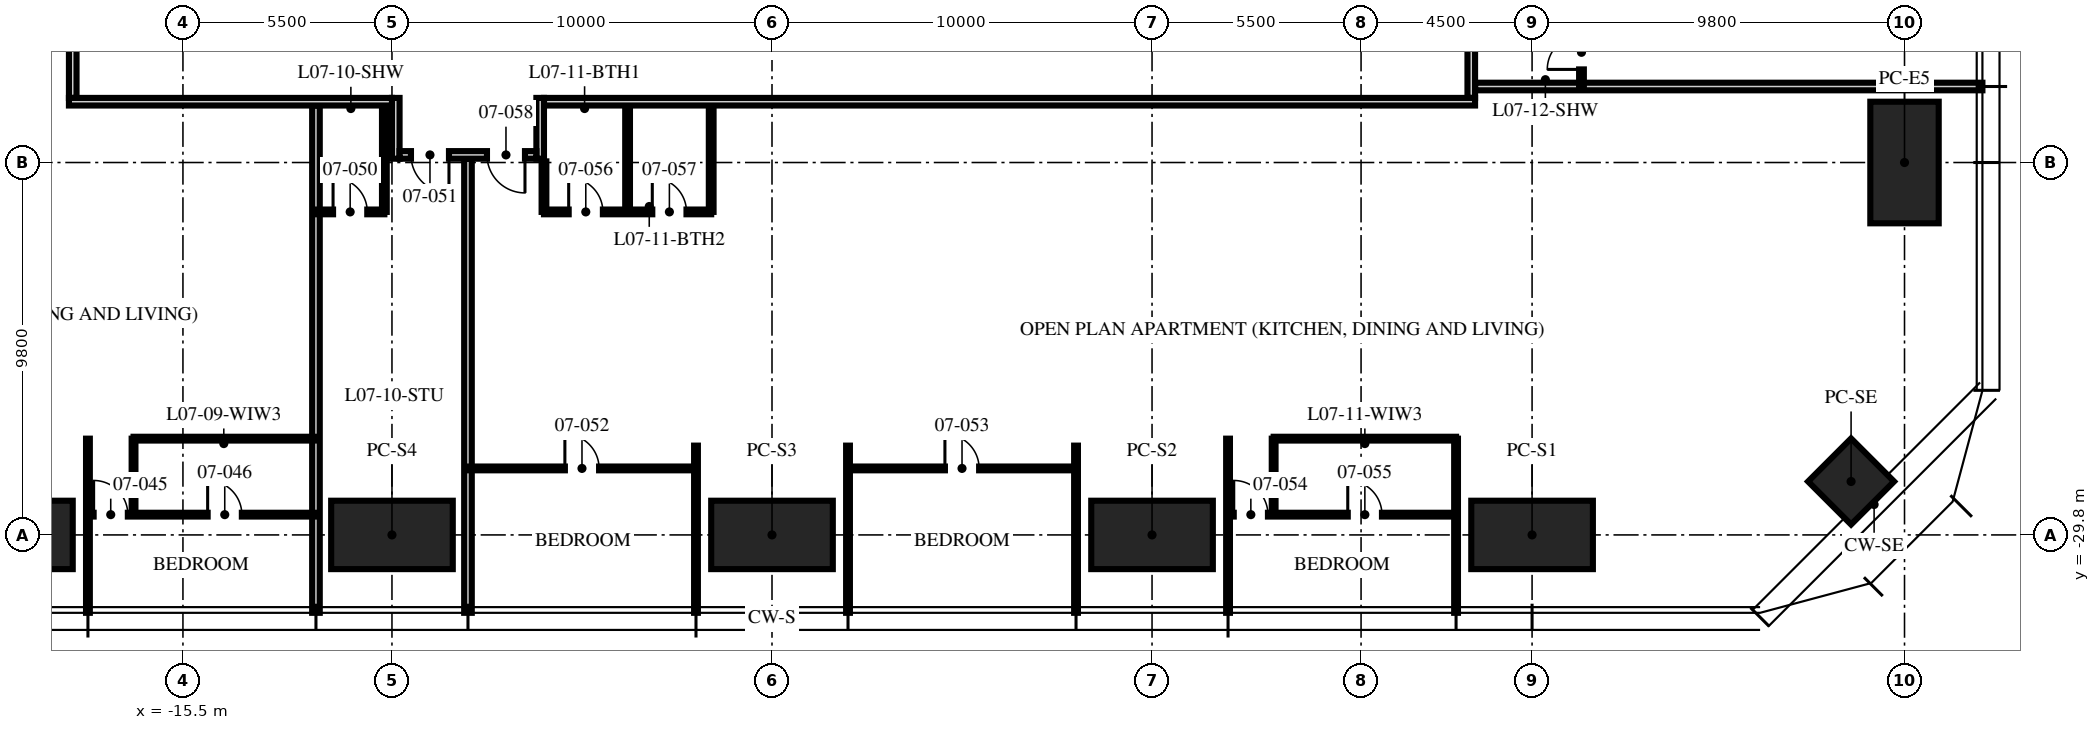
"""IFC4 building model, lengths in metres.
Left out: names, types, materials, properties, quantities, classifications, styles, units other than length and angle.
Written with IfcOpenShell. Run it as: python <this file> out.ifc"""

import sys

from ifc_helpers import new_model, si_unit, direction, frame, frame_2d, origin, origin_2d, place, context, subcontext, project, spatial, rectangle, hollow_rectangle, extrude, element, fill, save


model = new_model("IFC4")
c1 = context("Model", 3, precision=1e-05, world=origin(), true_north=direction((0.0, 1.0)))
c2 = subcontext(c1, "Body", "Model", "MODEL_VIEW")
j1 = project(units=[si_unit("LENGTHUNIT", "METRE"), si_unit("PLANEANGLEUNIT", "RADIAN")], contexts=[c1])
p1 = place(None, origin())
s1 = spatial("IfcSite", under=j1, at=p1, CompositionType="ELEMENT")
p2 = place(p1, origin())
s2 = spatial("IfcBuilding", under=s1, at=p2, CompositionType="ELEMENT")
p3 = place(p2, frame((0.0, 0.0, 32.25)))
s3 = spatial("IfcBuildingStorey", under=s2, at=p3, CompositionType="ELEMENT", Elevation=32.25)
for number, where, z_axis, x_axis in (
    (1, (29.8, -20.0, 0.0), (0.0, 0.0, 1.0), (0.0, 1.0, 0.0)),
    (2, (20.0, -29.8, 0.0), (0.0, 0.0, 1.0), (1.0, 0.0, 0.0)),
    (3, (10.0, -29.8, 0.0), (0.0, 0.0, 1.0), (1.0, 0.0, 0.0)),
    (4, (0.0, -29.8, 0.0), (0.0, 0.0, 1.0), (1.0, 0.0, 0.0)),
    (5, (-10.0, -29.8, 0.0), (0.0, 0.0, 1.0), (1.0, 0.0, 0.0)),
    (6, (-20.0, -29.8, 0.0), (0.0, 0.0, 1.0), (1.0, 0.0, 0.0)),
):
    element("IfcColumn", number, at=place(p3, frame(where, z_axis=z_axis, x_axis=x_axis)), inside=s3, PredefinedType="COLUMN", context=c2, shape_type="SweptSolid", body=[
        extrude(hollow_rectangle(XDim=3.2, YDim=1.8, WallThickness=0.2, at=origin_2d()), origin(), (0.0, 0.0, 1.0), 3.75),
    ])
p4 = place(p3, frame((28.394, -28.394, 0.0), z_axis=(0.0, 0.0, 1.0), x_axis=(0.707106781187, 0.707106781187, 0.0)))
e7 = element("IfcColumn", 7, at=p4, inside=s3, PredefinedType="COLUMN", context=c2, shape_type="SweptSolid", body=[
    extrude(hollow_rectangle(XDim=1.6, YDim=1.6, WallThickness=0.1, at=origin_2d()), origin(), (0.0, 0.0, 1.0), 3.75),
])
p5 = place(p3, frame((-18.0, -27.267, 0.0), z_axis=(0.0, 0.0, 1.0), x_axis=(0.0, -1.0, 0.0)))
e8 = element("IfcWall", 8, at=p5, inside=s3, PredefinedType="PARTITIONING", context=c2, shape_type="SweptSolid", body=[
    extrude(rectangle(XDim=4.583, YDim=0.1, at=frame_2d((2.292, 0.0))), origin(), (0.0, 0.0, 1.0), 2.71),
])
p6 = place(p3, frame((-12.0, -18.5, 0.0), z_axis=(0.0, 0.0, 1.0), x_axis=(0.0, -1.0, 0.0)))
e9 = element("IfcWall", 9, at=p6, inside=s3, PredefinedType="PARTITIONING", context=c2, shape_type="SweptSolid", body=[
    extrude(rectangle(XDim=13.35, YDim=0.2, at=frame_2d((6.675, 0.0))), origin(), (0.0, 0.0, 1.0), 2.71),
])
p7 = place(p3, frame((-8.0, -19.9, 0.0), z_axis=(0.0, 0.0, 1.0), x_axis=(0.0, -1.0, 0.0)))
e10 = element("IfcWall", 10, at=p7, inside=s3, PredefinedType="PARTITIONING", context=c2, shape_type="SweptSolid", body=[
    extrude(rectangle(XDim=11.95, YDim=0.2, at=frame_2d((5.975, 0.0))), origin(), (0.0, 0.0, 1.0), 2.71),
])
for number, where, z_axis, x_axis in (
    (11, (-2.0, -27.45, 0.0), (0.0, 0.0, 1.0), (0.0, -1.0, 0.0)),
    (12, (2.0, -27.45, 0.0), (0.0, 0.0, 1.0), (0.0, -1.0, 0.0)),
    (13, (8.0, -27.45, 0.0), (0.0, 0.0, 1.0), (0.0, -1.0, 0.0)),
):
    element("IfcWall", number, at=place(p3, frame(where, z_axis=z_axis, x_axis=x_axis)), inside=s3, PredefinedType="PARTITIONING", context=c2, shape_type="SweptSolid", body=[
        extrude(rectangle(XDim=4.4, YDim=0.1, at=frame_2d((2.2, 0.0))), origin(), (0.0, 0.0, 1.0), 2.71),
    ])
for number, where, z_axis, x_axis in (
    (14, (12.0, -27.267, 0.0), (0.0, 0.0, 1.0), (0.0, -1.0, 0.0)),
    (15, (18.0, -27.267, 0.0), (0.0, 0.0, 1.0), (0.0, -1.0, 0.0)),
):
    element("IfcWall", number, at=place(p3, frame(where, z_axis=z_axis, x_axis=x_axis)), inside=s3, PredefinedType="PARTITIONING", context=c2, shape_type="SweptSolid", body=[
        extrude(rectangle(XDim=4.583, YDim=0.1, at=frame_2d((2.292, 0.0))), origin(), (0.0, 0.0, 1.0), 2.71),
    ])
p8 = place(p3, frame((18.5, -18.0, 0.0), z_axis=(0.0, 0.0, 1.0), x_axis=(1.0, 0.0, 0.0)))
e16 = element("IfcWall", 16, at=p8, inside=s3, PredefinedType="PARTITIONING", context=c2, shape_type="SweptSolid", body=[
    extrude(rectangle(XDim=13.35, YDim=0.2, at=frame_2d((6.675, 0.0))), origin(), (0.0, 0.0, 1.0), 2.3),
])
p9 = place(p3, frame((-18.0, -29.267, 0.0), z_axis=(0.0, 0.0, 1.0), x_axis=(1.0, 0.0, 0.0)))
e17 = element("IfcWall", 17, at=p9, inside=s3, PredefinedType="PARTITIONING", context=c2, shape_type="SweptSolid", body=[
    extrude(rectangle(XDim=6.0, YDim=0.1, at=frame_2d((3.0, 0.0))), origin(), (0.0, 0.0, 1.0), 2.61),
])
p10 = place(p9, frame((0.15, 0.0, 0.0)))
e18 = element("IfcOpeningElement", 18, at=p10, cuts=e17, PredefinedType="OPENING", context=c2, shape_type="SweptSolid", body=[
    extrude(rectangle(XDim=0.9, YDim=2.1, at=frame_2d((0.45, 1.05))), frame((0.0, 0.06, 0.0), z_axis=(0.0, -1.0, 0.0), x_axis=(1.0, 0.0, 0.0)), (0.0, 0.0, 1.0), 0.12),
])
p11 = place(p9, frame((3.15, 0.0, 0.0)))
e19 = element("IfcOpeningElement", 19, at=p11, cuts=e17, PredefinedType="OPENING", context=c2, shape_type="SweptSolid", body=[
    extrude(rectangle(XDim=0.9, YDim=2.1, at=frame_2d((0.45, 1.05))), frame((0.0, 0.06, 0.0), z_axis=(0.0, -1.0, 0.0), x_axis=(1.0, 0.0, 0.0)), (0.0, 0.0, 1.0), 0.12),
])
p12 = place(p3, frame((-16.8, -27.267, 0.0), z_axis=(0.0, 0.0, 1.0), x_axis=(0.0, -1.0, 0.0)))
e20 = element("IfcWall", 20, at=p12, inside=s3, PredefinedType="PARTITIONING", context=c2, shape_type="SweptSolid", body=[
    extrude(rectangle(XDim=2.0, YDim=0.1, at=frame_2d((1.0, 0.0))), origin(), (0.0, 0.0, 1.0), 3.5),
])
p13 = place(p3, frame((-16.8, -27.267, 0.0), z_axis=(0.0, 0.0, 1.0), x_axis=(1.0, 0.0, 0.0)))
e21 = element("IfcWall", 21, at=p13, inside=s3, PredefinedType="PARTITIONING", context=c2, shape_type="SweptSolid", body=[
    extrude(rectangle(XDim=4.8, YDim=0.1, at=frame_2d((2.4, 0.0))), origin(), (0.0, 0.0, 1.0), 2.61),
])
p14 = place(p3, frame((-12.0, -21.3, 0.0), z_axis=(0.0, 0.0, 1.0), x_axis=(1.0, 0.0, 0.0)))
e22 = element("IfcWall", 22, at=p14, inside=s3, PredefinedType="PARTITIONING", context=c2, shape_type="SweptSolid", body=[
    extrude(rectangle(XDim=1.8, YDim=0.125, at=frame_2d((0.9, 0.0))), origin(), (0.0, 0.0, 1.0), 3.5),
])
p15 = place(p14, frame((0.45, 0.0, 0.0)))
e23 = element("IfcOpeningElement", 23, at=p15, cuts=e22, PredefinedType="OPENING", context=c2, shape_type="SweptSolid", body=[
    extrude(rectangle(XDim=0.9, YDim=2.1, at=frame_2d((0.45, 1.05))), frame((0.0, 0.073, 0.0), z_axis=(0.0, -1.0, 0.0), x_axis=(1.0, 0.0, 0.0)), (0.0, 0.0, 1.0), 0.145),
])
p16 = place(p3, frame((-10.2, -18.5, 0.0), z_axis=(0.0, 0.0, 1.0), x_axis=(0.0, -1.0, 0.0)))
e24 = element("IfcWall", 24, at=p16, inside=s3, PredefinedType="PARTITIONING", context=c2, shape_type="SweptSolid", body=[
    extrude(rectangle(XDim=2.8, YDim=0.125, at=frame_2d((1.4, 0.0))), origin(), (0.0, 0.0, 1.0), 2.492),
])
p17 = place(p3, frame((-8.0, -28.05, 0.0), z_axis=(0.0, 0.0, 1.0), x_axis=(1.0, 0.0, 0.0)))
e25 = element("IfcWall", 25, at=p17, inside=s3, PredefinedType="PARTITIONING", context=c2, shape_type="SweptSolid", body=[
    extrude(rectangle(XDim=6.0, YDim=0.1, at=frame_2d((3.0, 0.0))), origin(), (0.0, 0.0, 1.0), 2.61),
])
p18 = place(p17, frame((2.55, 0.0, 0.0)))
e26 = element("IfcOpeningElement", 26, at=p18, cuts=e25, PredefinedType="OPENING", context=c2, shape_type="SweptSolid", body=[
    extrude(rectangle(XDim=0.9, YDim=2.1, at=frame_2d((0.45, 1.05))), frame((0.0, 0.06, 0.0), z_axis=(0.0, -1.0, 0.0), x_axis=(1.0, 0.0, 0.0)), (0.0, 0.0, 1.0), 0.12),
])
p19 = place(p3, frame((2.0, -28.05, 0.0), z_axis=(0.0, 0.0, 1.0), x_axis=(1.0, 0.0, 0.0)))
e27 = element("IfcWall", 27, at=p19, inside=s3, PredefinedType="PARTITIONING", context=c2, shape_type="SweptSolid", body=[
    extrude(rectangle(XDim=6.0, YDim=0.1, at=frame_2d((3.0, 0.0))), origin(), (0.0, 0.0, 1.0), 2.61),
])
p20 = place(p19, frame((2.55, 0.0, 0.0)))
e28 = element("IfcOpeningElement", 28, at=p20, cuts=e27, PredefinedType="OPENING", context=c2, shape_type="SweptSolid", body=[
    extrude(rectangle(XDim=0.9, YDim=2.1, at=frame_2d((0.45, 1.05))), frame((0.0, 0.06, 0.0), z_axis=(0.0, -1.0, 0.0), x_axis=(1.0, 0.0, 0.0)), (0.0, 0.0, 1.0), 0.12),
])
p21 = place(p3, frame((12.0, -29.267, 0.0), z_axis=(0.0, 0.0, 1.0), x_axis=(1.0, 0.0, 0.0)))
e29 = element("IfcWall", 29, at=p21, inside=s3, PredefinedType="PARTITIONING", context=c2, shape_type="SweptSolid", body=[
    extrude(rectangle(XDim=6.0, YDim=0.1, at=frame_2d((3.0, 0.0))), origin(), (0.0, 0.0, 1.0), 2.61),
])
p22 = place(p21, frame((0.15, 0.0, 0.0)))
e30 = element("IfcOpeningElement", 30, at=p22, cuts=e29, PredefinedType="OPENING", context=c2, shape_type="SweptSolid", body=[
    extrude(rectangle(XDim=0.9, YDim=2.1, at=frame_2d((0.45, 1.05))), frame((0.0, 0.06, 0.0), z_axis=(0.0, -1.0, 0.0), x_axis=(1.0, 0.0, 0.0)), (0.0, 0.0, 1.0), 0.12),
])
p23 = place(p21, frame((3.15, 0.0, 0.0)))
e31 = element("IfcOpeningElement", 31, at=p23, cuts=e29, PredefinedType="OPENING", context=c2, shape_type="SweptSolid", body=[
    extrude(rectangle(XDim=0.9, YDim=2.1, at=frame_2d((0.45, 1.05))), frame((0.0, 0.06, 0.0), z_axis=(0.0, -1.0, 0.0), x_axis=(1.0, 0.0, 0.0)), (0.0, 0.0, 1.0), 0.12),
])
p24 = place(p3, frame((13.2, -27.267, 0.0), z_axis=(0.0, 0.0, 1.0), x_axis=(0.0, -1.0, 0.0)))
e32 = element("IfcWall", 32, at=p24, inside=s3, PredefinedType="PARTITIONING", context=c2, shape_type="SweptSolid", body=[
    extrude(rectangle(XDim=2.0, YDim=0.1, at=frame_2d((1.0, 0.0))), origin(), (0.0, 0.0, 1.0), 3.5),
])
p25 = place(p3, frame((13.2, -27.267, 0.0), z_axis=(0.0, 0.0, 1.0), x_axis=(1.0, 0.0, 0.0)))
e33 = element("IfcWall", 33, at=p25, inside=s3, PredefinedType="PARTITIONING", context=c2, shape_type="SweptSolid", body=[
    extrude(rectangle(XDim=4.8, YDim=0.1, at=frame_2d((2.4, 0.0))), origin(), (0.0, 0.0, 1.0), 2.61),
])
p26 = place(p3, frame((-6.0, -21.3, 0.0), z_axis=(0.0, 0.0, 1.0), x_axis=(1.0, 0.0, 0.0)))
e34 = element("IfcWall", 34, at=p26, inside=s3, PredefinedType="PARTITIONING", context=c2, shape_type="SweptSolid", body=[
    extrude(rectangle(XDim=4.4, YDim=0.125, at=frame_2d((2.2, 0.0))), origin(), (0.0, 0.0, 1.0), 2.61),
])
p27 = place(p26, frame((0.65, 0.0, 0.0)))
e35 = element("IfcOpeningElement", 35, at=p27, cuts=e34, PredefinedType="OPENING", context=c2, shape_type="SweptSolid", body=[
    extrude(rectangle(XDim=0.9, YDim=2.1, at=frame_2d((0.45, 1.05))), frame((0.0, 0.073, 0.0), z_axis=(0.0, -1.0, 0.0), x_axis=(1.0, 0.0, 0.0)), (0.0, 0.0, 1.0), 0.145),
])
p28 = place(p26, frame((2.85, 0.0, 0.0)))
e36 = element("IfcOpeningElement", 36, at=p28, cuts=e34, PredefinedType="OPENING", context=c2, shape_type="SweptSolid", body=[
    extrude(rectangle(XDim=0.9, YDim=2.1, at=frame_2d((0.45, 1.05))), frame((0.0, 0.073, 0.0), z_axis=(0.0, -1.0, 0.0), x_axis=(1.0, 0.0, 0.0)), (0.0, 0.0, 1.0), 0.145),
])
p29 = place(p3, frame((-6.0, -19.97, 0.0), z_axis=(0.0, 0.0, 1.0), x_axis=(0.0, -1.0, 0.0)))
e37 = element("IfcWall", 37, at=p29, inside=s3, PredefinedType="PARTITIONING", context=c2, shape_type="SweptSolid", body=[
    extrude(rectangle(XDim=1.33, YDim=0.125, at=frame_2d((0.665, 0.0))), origin(), (0.0, 0.0, 1.0), 3.5),
])
for number, where, z_axis, x_axis in (
    (38, (-3.8, -18.5, 0.0), (0.0, 0.0, 1.0), (0.0, -1.0, 0.0)),
    (39, (-1.6, -18.5, 0.0), (0.0, 0.0, 1.0), (0.0, -1.0, 0.0)),
):
    element("IfcWall", number, at=place(p3, frame(where, z_axis=z_axis, x_axis=x_axis)), inside=s3, PredefinedType="PARTITIONING", context=c2, shape_type="SweptSolid", body=[
        extrude(rectangle(XDim=2.8, YDim=0.125, at=frame_2d((1.4, 0.0))), origin(), (0.0, 0.0, 1.0), 3.5),
    ])
p30 = place(p3, frame((21.3, -18.0, 0.0), z_axis=(0.0, 0.0, 1.0), x_axis=(0.0, 1.0, 0.0)))
e40 = element("IfcWall", 40, at=p30, inside=s3, PredefinedType="PARTITIONING", context=c2, shape_type="SweptSolid", body=[
    extrude(rectangle(XDim=1.8, YDim=0.125, at=frame_2d((0.9, 0.0))), origin(), (0.0, 0.0, 1.0), 3.5),
])
p31 = place(p30, frame((0.45, 0.0, 0.0)))
e41 = element("IfcOpeningElement", 41, at=p31, cuts=e40, PredefinedType="OPENING", context=c2, shape_type="SweptSolid", body=[
    extrude(rectangle(XDim=0.9, YDim=2.1, at=frame_2d((0.45, 1.05))), frame((0.0, 0.073, 0.0), z_axis=(0.0, -1.0, 0.0), x_axis=(1.0, 0.0, 0.0)), (0.0, 0.0, 1.0), 0.145),
])
p32 = place(p3, frame((18.4, -18.3, 0.0), z_axis=(0.0, 0.0, 1.0), x_axis=(0.0, 1.0, 0.0)))
e42 = element("IfcWall", 42, at=p32, inside=s3, PredefinedType="PARTITIONING", context=c2, shape_type="SweptSolid", body=[
    extrude(rectangle(XDim=4.3, YDim=0.2, at=frame_2d((2.15, 0.0))), origin(), (0.0, 0.0, 1.0), 2.3),
])
p33 = place(p3, frame((-18.4, 0.0, 0.0), z_axis=(0.0, 0.0, 1.0), x_axis=(0.0, -1.0, 0.0)))
e43 = element("IfcWall", 43, at=p33, inside=s3, PredefinedType="PARTITIONING", context=c2, shape_type="SweptSolid", body=[
    extrude(rectangle(XDim=18.3, YDim=0.2, at=frame_2d((9.15, 0.0))), origin(), (0.0, 0.0, 1.0), 2.3),
])
p34 = place(p3, frame((18.5, -18.4, 0.0), z_axis=(0.0, 0.0, 1.0), x_axis=(-1.0, 0.0, 0.0)))
e44 = element("IfcWall", 44, at=p34, inside=s3, PredefinedType="PARTITIONING", context=c2, shape_type="SweptSolid", body=[
    extrude(rectangle(XDim=24.5, YDim=0.2, at=frame_2d((12.25, 0.0))), origin(), (0.0, 0.0, 1.0), 2.3),
])
p35 = place(p3, frame((-6.1, -18.3, 0.0), z_axis=(0.0, 0.0, 1.0), x_axis=(0.0, -1.0, 0.0)))
e45 = element("IfcWall", 45, at=p35, inside=s3, PredefinedType="PARTITIONING", context=c2, shape_type="SweptSolid", body=[
    extrude(rectangle(XDim=1.6, YDim=0.2, at=frame_2d((0.8, 0.0))), origin(), (0.0, 0.0, 1.0), 3.5),
])
p36 = place(p3, frame((-9.9, -18.3, 0.0), z_axis=(0.0, 0.0, 1.0), x_axis=(0.0, -1.0, 0.0)))
e46 = element("IfcWall", 46, at=p36, inside=s3, PredefinedType="PARTITIONING", context=c2, shape_type="SweptSolid", body=[
    extrude(rectangle(XDim=1.6, YDim=0.2, at=frame_2d((0.8, 0.0))), origin(), (0.0, 0.0, 1.0), 2.492),
])
p37 = place(p3, frame((-6.2, -19.8, 0.0), z_axis=(0.0, 0.0, 1.0), x_axis=(-1.0, 0.0, 0.0)))
e47 = element("IfcWall", 47, at=p37, inside=s3, PredefinedType="PARTITIONING", context=c2, shape_type="SweptSolid", body=[
    extrude(rectangle(XDim=3.6, YDim=0.2, at=frame_2d((1.8, 0.0))), origin(), (0.0, 0.0, 1.0), 3.5),
])
p38 = place(p37, frame((2.3, 0.0, 0.0)))
e48 = element("IfcOpeningElement", 48, at=p38, cuts=e47, PredefinedType="OPENING", context=c2, shape_type="SweptSolid", body=[
    extrude(rectangle(XDim=1.0, YDim=2.2, at=frame_2d((0.5, 1.1))), frame((0.0, 0.11, 0.0), z_axis=(0.0, -1.0, 0.0), x_axis=(1.0, 0.0, 0.0)), (0.0, 0.0, 1.0), 0.22),
])
p39 = place(p37, frame((0.3, 0.0, 0.0)))
e49 = element("IfcOpeningElement", 49, at=p39, cuts=e47, PredefinedType="OPENING", context=c2, shape_type="SweptSolid", body=[
    extrude(rectangle(XDim=1.0, YDim=2.2, at=frame_2d((0.5, 1.1))), frame((0.0, 0.11, 0.0), z_axis=(0.0, -1.0, 0.0), x_axis=(1.0, 0.0, 0.0)), (0.0, 0.0, 1.0), 0.22),
])
p40 = place(p3, frame((-10.0, -18.4, 0.0), z_axis=(0.0, 0.0, 1.0), x_axis=(-1.0, 0.0, 0.0)))
e50 = element("IfcWall", 50, at=p40, inside=s3, PredefinedType="PARTITIONING", context=c2, shape_type="SweptSolid", body=[
    extrude(rectangle(XDim=8.5, YDim=0.2, at=frame_2d((4.25, 0.0))), origin(), (0.0, 0.0, 1.0), 2.3),
])
p41 = place(p10, origin())
e51 = element("IfcDoor", 51, at=p41, inside=s3, OperationType="SINGLE_SWING_LEFT", PredefinedType="DOOR", context=c2, shape_type="SweptSolid", body=[
    extrude(rectangle(XDim=0.9, YDim=2.1, at=frame_2d((0.45, 1.05))), frame((0.0, 0.025, 0.0), z_axis=(0.0, -1.0, 0.0), x_axis=(1.0, 0.0, 0.0)), (0.0, 0.0, 1.0), 0.05),
])
fill(e18, e51)
p42 = place(p11, origin())
e52 = element("IfcDoor", 52, at=p42, inside=s3, OperationType="SINGLE_SWING_LEFT", PredefinedType="DOOR", context=c2, shape_type="SweptSolid", body=[
    extrude(rectangle(XDim=0.9, YDim=2.1, at=frame_2d((0.45, 1.05))), frame((0.0, 0.025, 0.0), z_axis=(0.0, -1.0, 0.0), x_axis=(1.0, 0.0, 0.0)), (0.0, 0.0, 1.0), 0.05),
])
fill(e19, e52)
p43 = place(p15, origin())
e53 = element("IfcDoor", 53, at=p43, inside=s3, OperationType="SINGLE_SWING_LEFT", PredefinedType="DOOR", context=c2, shape_type="SweptSolid", body=[
    extrude(rectangle(XDim=0.9, YDim=2.1, at=frame_2d((0.45, 1.05))), frame((0.0, 0.025, 0.0), z_axis=(0.0, -1.0, 0.0), x_axis=(1.0, 0.0, 0.0)), (0.0, 0.0, 1.0), 0.05),
])
fill(e23, e53)
p44 = place(p38, origin())
e54 = element("IfcDoor", 54, at=p44, inside=s3, OperationType="SINGLE_SWING_LEFT", PredefinedType="DOOR", context=c2, shape_type="SweptSolid", body=[
    extrude(rectangle(XDim=1.0, YDim=2.2, at=frame_2d((0.5, 1.1))), frame((0.0, 0.025, 0.0), z_axis=(0.0, -1.0, 0.0), x_axis=(1.0, 0.0, 0.0)), (0.0, 0.0, 1.0), 0.05),
])
fill(e48, e54)
p45 = place(p18, origin())
e55 = element("IfcDoor", 55, at=p45, inside=s3, OperationType="SINGLE_SWING_LEFT", PredefinedType="DOOR", context=c2, shape_type="SweptSolid", body=[
    extrude(rectangle(XDim=0.9, YDim=2.1, at=frame_2d((0.45, 1.05))), frame((0.0, 0.025, 0.0), z_axis=(0.0, -1.0, 0.0), x_axis=(1.0, 0.0, 0.0)), (0.0, 0.0, 1.0), 0.05),
])
fill(e26, e55)
p46 = place(p20, origin())
e56 = element("IfcDoor", 56, at=p46, inside=s3, OperationType="SINGLE_SWING_LEFT", PredefinedType="DOOR", context=c2, shape_type="SweptSolid", body=[
    extrude(rectangle(XDim=0.9, YDim=2.1, at=frame_2d((0.45, 1.05))), frame((0.0, 0.025, 0.0), z_axis=(0.0, -1.0, 0.0), x_axis=(1.0, 0.0, 0.0)), (0.0, 0.0, 1.0), 0.05),
])
fill(e28, e56)
p47 = place(p22, origin())
e57 = element("IfcDoor", 57, at=p47, inside=s3, OperationType="SINGLE_SWING_LEFT", PredefinedType="DOOR", context=c2, shape_type="SweptSolid", body=[
    extrude(rectangle(XDim=0.9, YDim=2.1, at=frame_2d((0.45, 1.05))), frame((0.0, 0.025, 0.0), z_axis=(0.0, -1.0, 0.0), x_axis=(1.0, 0.0, 0.0)), (0.0, 0.0, 1.0), 0.05),
])
fill(e30, e57)
p48 = place(p23, origin())
e58 = element("IfcDoor", 58, at=p48, inside=s3, OperationType="SINGLE_SWING_LEFT", PredefinedType="DOOR", context=c2, shape_type="SweptSolid", body=[
    extrude(rectangle(XDim=0.9, YDim=2.1, at=frame_2d((0.45, 1.05))), frame((0.0, 0.025, 0.0), z_axis=(0.0, -1.0, 0.0), x_axis=(1.0, 0.0, 0.0)), (0.0, 0.0, 1.0), 0.05),
])
fill(e31, e58)
p49 = place(p27, origin())
e59 = element("IfcDoor", 59, at=p49, inside=s3, OperationType="SINGLE_SWING_LEFT", PredefinedType="DOOR", context=c2, shape_type="SweptSolid", body=[
    extrude(rectangle(XDim=0.9, YDim=2.1, at=frame_2d((0.45, 1.05))), frame((0.0, 0.025, 0.0), z_axis=(0.0, -1.0, 0.0), x_axis=(1.0, 0.0, 0.0)), (0.0, 0.0, 1.0), 0.05),
])
fill(e35, e59)
p50 = place(p28, origin())
e60 = element("IfcDoor", 60, at=p50, inside=s3, OperationType="SINGLE_SWING_LEFT", PredefinedType="DOOR", context=c2, shape_type="SweptSolid", body=[
    extrude(rectangle(XDim=0.9, YDim=2.1, at=frame_2d((0.45, 1.05))), frame((0.0, 0.025, 0.0), z_axis=(0.0, -1.0, 0.0), x_axis=(1.0, 0.0, 0.0)), (0.0, 0.0, 1.0), 0.05),
])
fill(e36, e60)
p51 = place(p39, origin())
e61 = element("IfcDoor", 61, at=p51, inside=s3, OperationType="SINGLE_SWING_LEFT", PredefinedType="DOOR", context=c2, shape_type="SweptSolid", body=[
    extrude(rectangle(XDim=1.0, YDim=2.2, at=frame_2d((0.5, 1.1))), frame((0.0, 0.025, 0.0), z_axis=(0.0, -1.0, 0.0), x_axis=(1.0, 0.0, 0.0)), (0.0, 0.0, 1.0), 0.05),
])
fill(e49, e61)
p52 = place(p31, origin())
e62 = element("IfcDoor", 62, at=p52, inside=s3, OperationType="SINGLE_SWING_LEFT", PredefinedType="DOOR", context=c2, shape_type="SweptSolid", body=[
    extrude(rectangle(XDim=0.9, YDim=2.1, at=frame_2d((0.45, 1.05))), frame((0.0, 0.025, 0.0), z_axis=(0.0, -1.0, 0.0), x_axis=(1.0, 0.0, 0.0)), (0.0, 0.0, 1.0), 0.05),
])
fill(e41, e62)
save(model, sys.argv[1])
